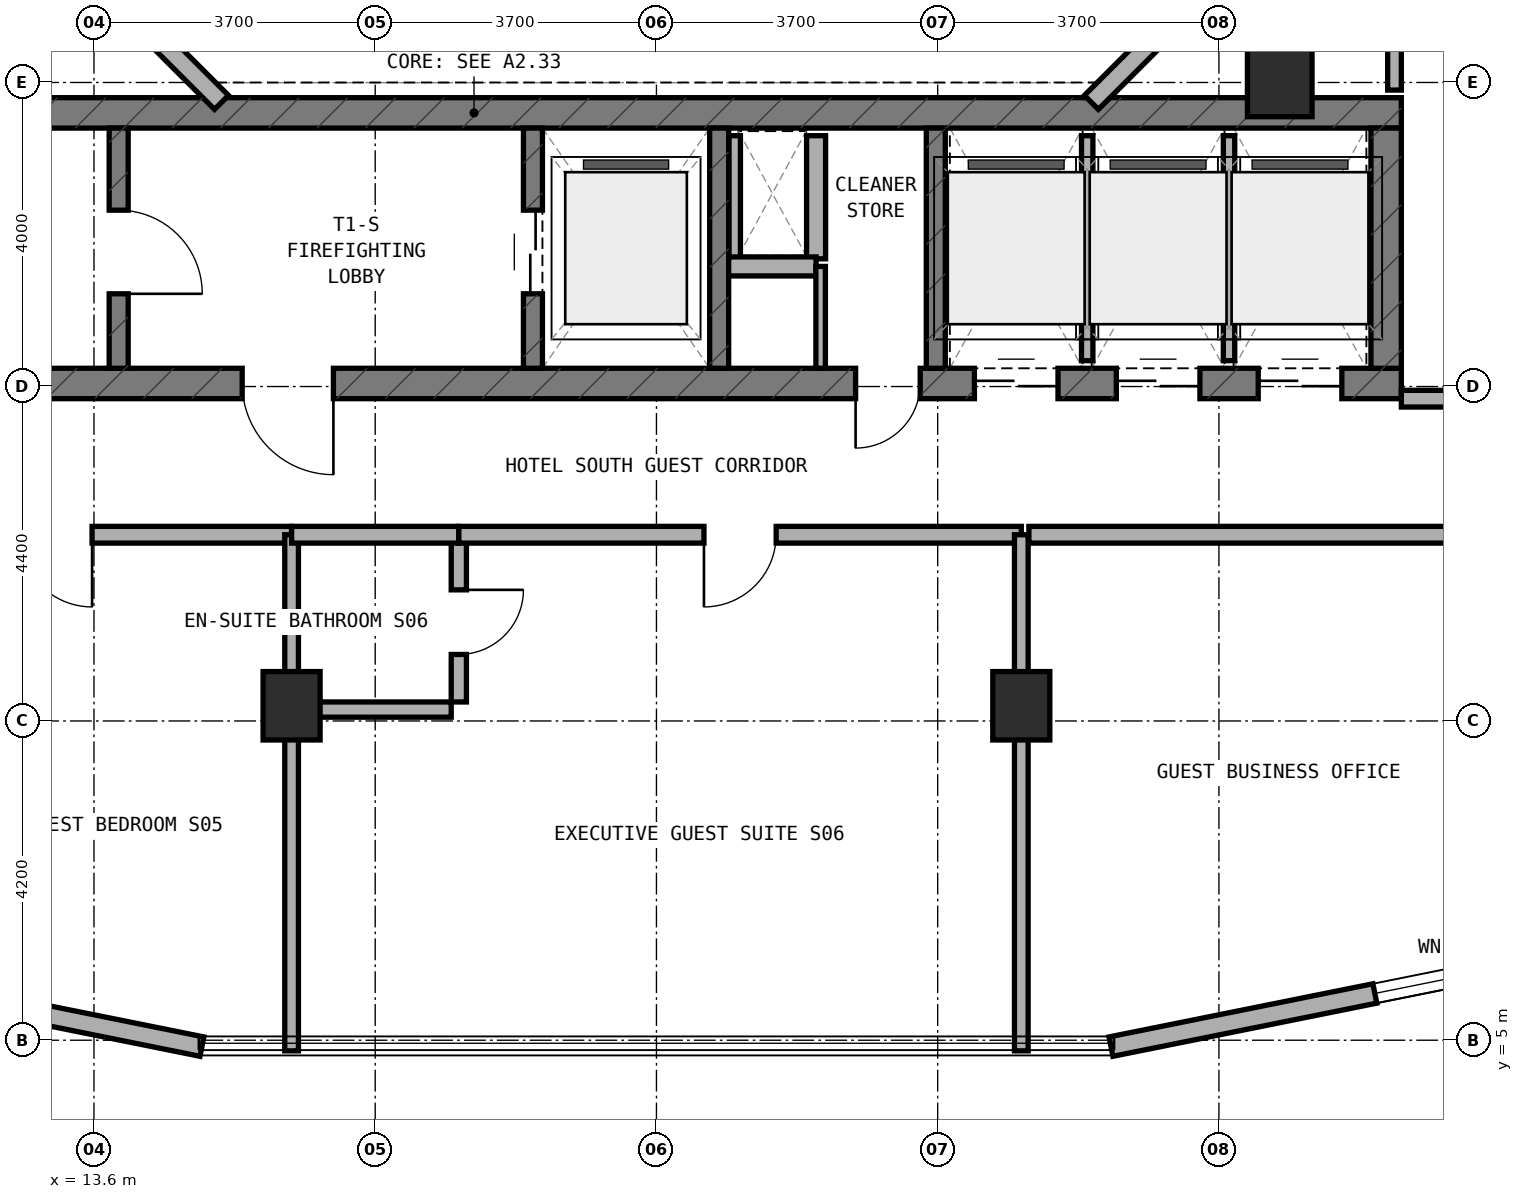
"""IFC4 building model, lengths in metres.
Left out: names, types, materials, properties, quantities, classifications, styles, units other than length and angle.
Written with IfcOpenShell. Run it as: python <this file> out.ifc"""

import sys

from ifc_helpers import new_model, si_unit, direction, frame, frame_2d, origin, origin_2d, place, context, subcontext, project, spatial, rectangle, extrude, element, fill, save


model = new_model("IFC4")
c1 = context("Model", 3, precision=1e-05, world=origin(), true_north=direction((0.0, 1.0)))
c2 = subcontext(c1, "Body", "Model", "MODEL_VIEW")
j1 = project(units=[si_unit("LENGTHUNIT", "METRE"), si_unit("PLANEANGLEUNIT", "RADIAN")], contexts=[c1])
p1 = place(None, origin())
s1 = spatial("IfcSite", under=j1, at=p1, CompositionType="ELEMENT")
p2 = place(p1, origin())
s2 = spatial("IfcBuilding", under=s1, at=p2, CompositionType="ELEMENT")
p3 = place(p2, frame((0.0, 0.0, 145.0)))
s3 = spatial("IfcBuildingStorey", under=s2, at=p3, CompositionType="ELEMENT", Elevation=145.0)
p4 = place(p3, frame((6.4, 13.64, 0.0), z_axis=(0.0, 0.0, 1.0), x_axis=(1.0, 0.0, 0.0)))
e1 = element("IfcWall", 1, at=p4, inside=s3, PredefinedType="SHEAR", context=c2, shape_type="SweptSolid", body=[
    extrude(rectangle(XDim=24.4, YDim=0.4, at=frame_2d((12.2, 0.0))), origin(), (0.0, 0.0, 1.0), 3.5),
])
p5 = place(p4, frame((9.15, 0.0, 0.0)))
e2 = element("IfcOpeningElement", 2, at=p5, cuts=e1, PredefinedType="OPENING", context=c2, shape_type="SweptSolid", body=[
    extrude(rectangle(XDim=1.2, YDim=2.15, at=frame_2d((0.6, 1.075))), frame((0.0, 0.21, 0.0), z_axis=(0.0, -1.0, 0.0), x_axis=(1.0, 0.0, 0.0)), (0.0, 0.0, 1.0), 0.42),
])
p6 = place(p4, frame((17.22, 0.0, 0.0)))
e3 = element("IfcOpeningElement", 3, at=p6, cuts=e1, PredefinedType="OPENING", context=c2, shape_type="SweptSolid", body=[
    extrude(rectangle(XDim=0.85, YDim=2.1, at=frame_2d((0.425, 1.05))), frame((0.0, 0.21, 0.0), z_axis=(0.0, -1.0, 0.0), x_axis=(1.0, 0.0, 0.0)), (0.0, 0.0, 1.0), 0.42),
])
p7 = place(p4, frame((18.783, 0.0, 0.0)))
e4 = element("IfcOpeningElement", 4, at=p7, cuts=e1, PredefinedType="OPENING", context=c2, shape_type="SweptSolid", body=[
    extrude(rectangle(XDim=1.1, YDim=2.15, at=frame_2d((0.55, 1.075))), frame((0.0, 0.21, 0.0), z_axis=(0.0, -1.0, 0.0), x_axis=(1.0, 0.0, 0.0)), (0.0, 0.0, 1.0), 0.42),
])
p8 = place(p4, frame((20.65, 0.0, 0.0)))
e5 = element("IfcOpeningElement", 5, at=p8, cuts=e1, PredefinedType="OPENING", context=c2, shape_type="SweptSolid", body=[
    extrude(rectangle(XDim=1.1, YDim=2.15, at=frame_2d((0.55, 1.075))), frame((0.0, 0.21, 0.0), z_axis=(0.0, -1.0, 0.0), x_axis=(1.0, 0.0, 0.0)), (0.0, 0.0, 1.0), 0.42),
])
p9 = place(p4, frame((22.517, 0.0, 0.0)))
e6 = element("IfcOpeningElement", 6, at=p9, cuts=e1, PredefinedType="OPENING", context=c2, shape_type="SweptSolid", body=[
    extrude(rectangle(XDim=1.1, YDim=2.15, at=frame_2d((0.55, 1.075))), frame((0.0, 0.21, 0.0), z_axis=(0.0, -1.0, 0.0), x_axis=(1.0, 0.0, 0.0)), (0.0, 0.0, 1.0), 0.42),
])
p10 = place(p3, frame((6.4, 17.2, 0.0), z_axis=(0.0, 0.0, 1.0), x_axis=(1.0, 0.0, 0.0)))
e7 = element("IfcWall", 7, at=p10, inside=s3, PredefinedType="SHEAR", context=c2, shape_type="SweptSolid", body=[
    extrude(rectangle(XDim=24.4, YDim=0.4, at=frame_2d((12.2, 0.0))), origin(), (0.0, 0.0, 1.0), 3.5),
])
p11 = place(p3, frame((30.6, 13.84, 0.0), z_axis=(0.0, 0.0, 1.0), x_axis=(0.0, 1.0, 0.0)))
e8 = element("IfcWall", 8, at=p11, inside=s3, PredefinedType="SHEAR", context=c2, shape_type="SweptSolid", body=[
    extrude(rectangle(XDim=3.16, YDim=0.4, at=frame_2d((1.58, 0.0))), origin(), (0.0, 0.0, 1.0), 3.5),
])
p12 = place(p3, frame((13.925, 13.84, 0.0), z_axis=(0.0, 0.0, 1.0), x_axis=(0.0, 1.0, 0.0)))
e9 = element("IfcWall", 9, at=p12, inside=s3, PredefinedType="STANDARD", context=c2, shape_type="SweptSolid", body=[
    extrude(rectangle(XDim=3.16, YDim=0.25, at=frame_2d((1.58, 0.0))), origin(), (0.0, 0.0, 1.0), 3.22),
])
p13 = place(p12, frame((0.98, 0.0, 0.0)))
e10 = element("IfcOpeningElement", 10, at=p13, cuts=e9, PredefinedType="OPENING", context=c2, shape_type="SweptSolid", body=[
    extrude(rectangle(XDim=1.1, YDim=2.15, at=frame_2d((0.55, 1.075))), frame((0.0, 0.135, 0.0), z_axis=(0.0, -1.0, 0.0), x_axis=(1.0, 0.0, 0.0)), (0.0, 0.0, 1.0), 0.27),
])
p14 = place(p3, frame((19.375, 13.84, 0.0), z_axis=(0.0, 0.0, 1.0), x_axis=(0.0, 1.0, 0.0)))
e11 = element("IfcWall", 11, at=p14, inside=s3, PredefinedType="STANDARD", context=c2, shape_type="SweptSolid", body=[
    extrude(rectangle(XDim=3.16, YDim=0.25, at=frame_2d((1.58, 0.0))), origin(), (0.0, 0.0, 1.0), 3.22),
])
p15 = place(p14, frame((0.98, 0.0, 0.0)))
e12 = element("IfcOpeningElement", 12, at=p15, cuts=e11, PredefinedType="OPENING", context=c2, shape_type="SweptSolid", body=[
    extrude(rectangle(XDim=1.1, YDim=2.15, at=frame_2d((0.55, 1.075))), frame((0.0, 0.135, 0.0), z_axis=(0.0, -1.0, 0.0), x_axis=(1.0, 0.0, 0.0)), (0.0, 0.0, 1.0), 0.27),
])
for number, where, z_axis, x_axis in (
    (13, (21.825, 13.84, 0.0), (0.0, 0.0, 1.0), (0.0, 1.0, 0.0)),
    (14, (24.675, 13.84, 0.0), (0.0, 0.0, 1.0), (0.0, 1.0, 0.0)),
):
    element("IfcWall", number, at=place(p3, frame(where, z_axis=z_axis, x_axis=x_axis)), inside=s3, PredefinedType="STANDARD", context=c2, shape_type="SweptSolid", body=[
        extrude(rectangle(XDim=3.16, YDim=0.25, at=frame_2d((1.58, 0.0))), origin(), (0.0, 0.0, 1.0), 3.22),
    ])
for number, where, z_axis, x_axis in (
    (15, (16.2, 9.4, 0.0), (0.0, 0.0, 1.0), (1.0, 0.0, 0.0)),
    (16, (25.8, 9.4, 0.0), (0.0, 0.0, 1.0), (1.0, 0.0, 0.0)),
):
    element("IfcColumn", number, at=place(p3, frame(where, z_axis=z_axis, x_axis=x_axis)), inside=s3, PredefinedType="COLUMN", context=c2, shape_type="SweptSolid", body=[
        extrude(rectangle(XDim=0.75, YDim=0.9, at=origin_2d()), origin(), (0.0, 0.0, 1.0), 3.5),
    ])
p16 = place(p3, frame((29.2, 17.65, 0.0), z_axis=(0.0, 0.0, 1.0), x_axis=(1.0, 0.0, 0.0)))
e17 = element("IfcColumn", 17, at=p16, inside=s3, PredefinedType="COLUMN", context=c2, shape_type="SweptSolid", body=[
    extrude(rectangle(XDim=0.85, YDim=1.0, at=origin_2d()), origin(), (0.0, 0.0, 1.0), 3.5),
])
p17 = place(p3, frame((6.018, 6.729, 0.0), z_axis=(0.0, 0.0, 1.0), x_axis=(0.980315963543, -0.197435082048, 0.0)))
e18 = element("IfcWall", 18, at=p17, inside=s3, PredefinedType="STANDARD", context=c2, shape_type="SweptSolid", body=[
    extrude(rectangle(XDim=9.183, YDim=0.26, at=frame_2d((4.591, 0.0))), origin(), (0.0, 0.0, 1.0), 3.22),
])
p18 = place(p17, frame((4.487, 0.0, 0.85)))
e19 = element("IfcOpeningElement", 19, at=p18, cuts=e18, PredefinedType="OPENING", context=c2, shape_type="SweptSolid", body=[
    extrude(rectangle(XDim=2.1, YDim=1.5, at=frame_2d((1.05, 0.75))), frame((0.0, 0.14, 0.0), z_axis=(0.0, -1.0, 0.0), x_axis=(1.0, 0.0, 0.0)), (0.0, 0.0, 1.0), 0.28),
])
p19 = place(p3, frame((26.98, 4.916, 0.0), z_axis=(0.0, 0.0, 1.0), x_axis=(0.980315963543, 0.197435082048, 0.0)))
e20 = element("IfcWall", 20, at=p19, inside=s3, PredefinedType="STANDARD", context=c2, shape_type="SweptSolid", body=[
    extrude(rectangle(XDim=9.183, YDim=0.26, at=frame_2d((4.591, 0.0))), origin(), (0.0, 0.0, 1.0), 3.22),
])
p20 = place(p19, frame((3.541, 0.0, 0.85)))
e21 = element("IfcOpeningElement", 21, at=p20, cuts=e20, PredefinedType="OPENING", context=c2, shape_type="SweptSolid", body=[
    extrude(rectangle(XDim=2.1, YDim=1.5, at=frame_2d((1.05, 0.75))), frame((0.0, 0.14, 0.0), z_axis=(0.0, -1.0, 0.0), x_axis=(1.0, 0.0, 0.0)), (0.0, 0.0, 1.0), 0.28),
])
for number, where, z_axis, x_axis in (
    (22, (26.722, 17.338, 0.0), (0.0, 0.0, 1.0), (0.707, 0.707, 0.0)),
    (23, (13.444, 19.172, 0.0), (0.0, 0.0, 1.0), (0.707, -0.707, 0.0)),
):
    element("IfcWall", number, at=place(p3, frame(where, z_axis=z_axis, x_axis=x_axis)), inside=s3, PredefinedType="STANDARD", context=c2, shape_type="SweptSolid", body=[
        extrude(rectangle(XDim=2.594, YDim=0.26, at=frame_2d((1.297, 0.0))), origin(), (0.0, 0.0, 1.0), 3.22),
    ])
p21 = place(p3, frame((22.03, 15.28, 0.0), z_axis=(0.0, 0.0, 1.0), x_axis=(0.0, 1.0, 0.0)))
e24 = element("IfcWall", 24, at=p21, inside=s3, PredefinedType="PARTITIONING", context=c2, shape_type="SweptSolid", body=[
    extrude(rectangle(XDim=1.62, YDim=0.15, at=frame_2d((0.81, 0.0))), origin(), (0.0, 0.0, 1.0), 3.22),
])
p22 = place(p3, frame((23.1, 15.28, 0.0), z_axis=(0.0, 0.0, 1.0), x_axis=(0.0, 1.0, 0.0)))
e25 = element("IfcWall", 25, at=p22, inside=s3, PredefinedType="SOLIDWALL", context=c2, shape_type="SweptSolid", body=[
    extrude(rectangle(XDim=1.62, YDim=0.25, at=frame_2d((0.81, 0.0))), origin(), (0.0, 0.0, 1.0), 3.22),
])
p23 = place(p3, frame((21.95, 15.18, 0.0), z_axis=(0.0, 0.0, 1.0), x_axis=(1.0, 0.0, 0.0)))
e26 = element("IfcWall", 26, at=p23, inside=s3, PredefinedType="SOLIDWALL", context=c2, shape_type="SweptSolid", body=[
    extrude(rectangle(XDim=1.15, YDim=0.25, at=frame_2d((0.575, 0.0))), origin(), (0.0, 0.0, 1.0), 3.22),
])
p24 = place(p3, frame((23.16, 13.84, 0.0), z_axis=(0.0, 0.0, 1.0), x_axis=(0.0, 1.0, 0.0)))
e27 = element("IfcWall", 27, at=p24, inside=s3, PredefinedType="PARTITIONING", context=c2, shape_type="SweptSolid", body=[
    extrude(rectangle(XDim=1.34, YDim=0.125, at=frame_2d((0.67, 0.0))), origin(), (0.0, 0.0, 1.0), 3.22),
])
p25 = place(p3, frame((26.667, 13.94, 0.0), z_axis=(0.0, 0.0, 1.0), x_axis=(0.0, 1.0, 0.0)))
e28 = element("IfcWall", 28, at=p25, inside=s3, PredefinedType="PARTITIONING", context=c2, shape_type="SweptSolid", body=[
    extrude(rectangle(XDim=2.96, YDim=0.15, at=frame_2d((1.48, 0.0))), origin(), (0.0, 0.0, 1.0), 3.22),
])
p26 = place(p3, frame((28.533, 13.94, 0.0), z_axis=(0.0, 0.0, 1.0), x_axis=(0.0, 1.0, 0.0)))
e29 = element("IfcWall", 29, at=p26, inside=s3, PredefinedType="PARTITIONING", context=c2, shape_type="SweptSolid", body=[
    extrude(rectangle(XDim=2.96, YDim=0.15, at=frame_2d((1.48, 0.0))), origin(), (0.0, 0.0, 1.0), 2.795),
])
p27 = place(p3, frame((10.0, 11.65, 0.0), z_axis=(0.0, 0.0, 1.0), x_axis=(1.0, 0.0, 0.0)))
e30 = element("IfcWall", 30, at=p27, inside=s3, PredefinedType="SOLIDWALL", context=c2, shape_type="SweptSolid", body=[
    extrude(rectangle(XDim=6.2, YDim=0.22, at=frame_2d((3.1, 0.0))), origin(), (0.0, 0.0, 1.0), 2.795),
])
p28 = place(p27, frame((2.625, 0.0, 0.0)))
e31 = element("IfcOpeningElement", 31, at=p28, cuts=e30, PredefinedType="OPENING", context=c2, shape_type="SweptSolid", body=[
    extrude(rectangle(XDim=0.95, YDim=2.1, at=frame_2d((0.475, 1.05))), frame((0.0, 0.12, 0.0), z_axis=(0.0, -1.0, 0.0), x_axis=(1.0, 0.0, 0.0)), (0.0, 0.0, 1.0), 0.24),
])
p29 = place(p3, frame((16.2, 4.86, 0.0), z_axis=(0.0, 0.0, 1.0), x_axis=(0.0, 1.0, 0.0)))
e32 = element("IfcWall", 32, at=p29, inside=s3, PredefinedType="SOLIDWALL", context=c2, shape_type="SweptSolid", body=[
    extrude(rectangle(XDim=6.79, YDim=0.18, at=frame_2d((3.395, 0.0))), origin(), (0.0, 0.0, 1.0), 2.795),
])
p30 = place(p3, frame((18.4, 9.45, 0.0), z_axis=(0.0, 0.0, 1.0), x_axis=(0.0, 1.0, 0.0)))
e33 = element("IfcWall", 33, at=p30, inside=s3, PredefinedType="PLUMBINGWALL", context=c2, shape_type="SweptSolid", body=[
    extrude(rectangle(XDim=2.1, YDim=0.2, at=frame_2d((1.05, 0.0))), origin(), (0.0, 0.0, 1.0), 2.835),
])
p31 = place(p30, frame((0.625, 0.0, 0.0)))
e34 = element("IfcOpeningElement", 34, at=p31, cuts=e33, PredefinedType="OPENING", context=c2, shape_type="SweptSolid", body=[
    extrude(rectangle(XDim=0.85, YDim=2.1, at=frame_2d((0.425, 1.05))), frame((0.0, 0.11, 0.0), z_axis=(0.0, -1.0, 0.0), x_axis=(1.0, 0.0, 0.0)), (0.0, 0.0, 1.0), 0.22),
])
p32 = place(p3, frame((16.3, 9.35, 0.0), z_axis=(0.0, 0.0, 1.0), x_axis=(1.0, 0.0, 0.0)))
e35 = element("IfcWall", 35, at=p32, inside=s3, PredefinedType="PLUMBINGWALL", context=c2, shape_type="SweptSolid", body=[
    extrude(rectangle(XDim=2.0, YDim=0.2, at=frame_2d((1.0, 0.0))), origin(), (0.0, 0.0, 1.0), 2.835),
])
p33 = place(p3, frame((16.2, 11.65, 0.0), z_axis=(0.0, 0.0, 1.0), x_axis=(1.0, 0.0, 0.0)))
e36 = element("IfcWall", 36, at=p33, inside=s3, PredefinedType="SOLIDWALL", context=c2, shape_type="SweptSolid", body=[
    extrude(rectangle(XDim=2.2, YDim=0.22, at=frame_2d((1.1, 0.0))), origin(), (0.0, 0.0, 1.0), 2.795),
])
p34 = place(p3, frame((18.4, 11.65, 0.0), z_axis=(0.0, 0.0, 1.0), x_axis=(1.0, 0.0, 0.0)))
e37 = element("IfcWall", 37, at=p34, inside=s3, PredefinedType="SOLIDWALL", context=c2, shape_type="SweptSolid", body=[
    extrude(rectangle(XDim=7.4, YDim=0.22, at=frame_2d((3.7, 0.0))), origin(), (0.0, 0.0, 1.0), 2.795),
])
p35 = place(p34, frame((3.225, 0.0, 0.0)))
e38 = element("IfcOpeningElement", 38, at=p35, cuts=e37, PredefinedType="OPENING", context=c2, shape_type="SweptSolid", body=[
    extrude(rectangle(XDim=0.95, YDim=2.1, at=frame_2d((0.475, 1.05))), frame((0.0, 0.12, 0.0), z_axis=(0.0, -1.0, 0.0), x_axis=(1.0, 0.0, 0.0)), (0.0, 0.0, 1.0), 0.24),
])
p36 = place(p3, frame((25.8, 4.86, 0.0), z_axis=(0.0, 0.0, 1.0), x_axis=(0.0, 1.0, 0.0)))
e39 = element("IfcWall", 39, at=p36, inside=s3, PredefinedType="SOLIDWALL", context=c2, shape_type="SweptSolid", body=[
    extrude(rectangle(XDim=6.79, YDim=0.18, at=frame_2d((3.395, 0.0))), origin(), (0.0, 0.0, 1.0), 2.795),
])
p37 = place(p3, frame((25.9, 11.65, 0.0), z_axis=(0.0, 0.0, 1.0), x_axis=(1.0, 0.0, 0.0)))
e40 = element("IfcWall", 40, at=p37, inside=s3, PredefinedType="SOLIDWALL", context=c2, shape_type="SweptSolid", body=[
    extrude(rectangle(XDim=15.04, YDim=0.22, at=frame_2d((7.52, 0.0))), origin(), (0.0, 0.0, 1.0), 2.795),
])
p38 = place(p37, frame((6.33, 0.0, 0.0)))
e41 = element("IfcOpeningElement", 41, at=p38, cuts=e40, PredefinedType="OPENING", context=c2, shape_type="SweptSolid", body=[
    extrude(rectangle(XDim=0.95, YDim=2.1, at=frame_2d((0.475, 1.05))), frame((0.0, 0.12, 0.0), z_axis=(0.0, -1.0, 0.0), x_axis=(1.0, 0.0, 0.0)), (0.0, 0.0, 1.0), 0.24),
])
p39 = place(p3, frame((30.71, 17.5, 0.0), z_axis=(0.0, 0.0, 1.0), x_axis=(0.0, 1.0, 0.0)))
e42 = element("IfcWall", 42, at=p39, inside=s3, PredefinedType="SOLIDWALL", context=c2, shape_type="SweptSolid", body=[
    extrude(rectangle(XDim=15.0, YDim=0.18, at=frame_2d((7.5, 0.0))), origin(), (0.0, 0.0, 1.0), 2.795),
])
p40 = place(p3, frame((30.8, 13.44, 0.0), z_axis=(0.0, 0.0, 1.0), x_axis=(1.0, 0.0, 0.0)))
e43 = element("IfcWall", 43, at=p40, inside=s3, PredefinedType="SOLIDWALL", context=c2, shape_type="SweptSolid", body=[
    extrude(rectangle(XDim=5.65, YDim=0.22, at=frame_2d((2.825, 0.0))), origin(), (0.0, 0.0, 1.0), 2.795),
])
p41 = place(p40, frame((2.35, 0.0, 0.0)))
e44 = element("IfcOpeningElement", 44, at=p41, cuts=e43, PredefinedType="OPENING", context=c2, shape_type="SweptSolid", body=[
    extrude(rectangle(XDim=0.95, YDim=2.1, at=frame_2d((0.475, 1.05))), frame((0.0, 0.12, 0.0), z_axis=(0.0, -1.0, 0.0), x_axis=(1.0, 0.0, 0.0)), (0.0, 0.0, 1.0), 0.24),
])
p42 = place(p20, origin())
e45 = element("IfcWindow", 45, at=p42, inside=s3, PartitioningType="SINGLE_PANEL", PredefinedType="WINDOW", context=c2, shape_type="SweptSolid", body=[
    extrude(rectangle(XDim=2.1, YDim=1.5, at=frame_2d((1.05, 0.75))), frame((0.0, 0.03, 0.0), z_axis=(0.0, -1.0, 0.0), x_axis=(1.0, 0.0, 0.0)), (0.0, 0.0, 1.0), 0.06),
])
fill(e21, e45)
p43 = place(p13, frame((1.1, 0.0, 0.0), z_axis=(0.0, 0.0, 1.0), x_axis=(-1.0, 0.0, 0.0)))
e46 = element("IfcDoor", 46, at=p43, inside=s3, OperationType="SINGLE_SWING_RIGHT", PredefinedType="DOOR", context=c2, shape_type="SweptSolid", body=[
    extrude(rectangle(XDim=1.1, YDim=2.15, at=frame_2d((0.55, 1.075))), frame((0.0, 0.025, 0.0), z_axis=(0.0, -1.0, 0.0), x_axis=(1.0, 0.0, 0.0)), (0.0, 0.0, 1.0), 0.05),
])
fill(e10, e46)
p44 = place(p5, frame((1.2, 0.0, 0.0), z_axis=(0.0, 0.0, 1.0), x_axis=(-1.0, 0.0, 0.0)))
e47 = element("IfcDoor", 47, at=p44, inside=s3, OperationType="SINGLE_SWING_LEFT", PredefinedType="DOOR", context=c2, shape_type="SweptSolid", body=[
    extrude(rectangle(XDim=1.2, YDim=2.15, at=frame_2d((0.6, 1.075))), frame((0.0, 0.025, 0.0), z_axis=(0.0, -1.0, 0.0), x_axis=(1.0, 0.0, 0.0)), (0.0, 0.0, 1.0), 0.05),
])
fill(e2, e47)
p45 = place(p15, origin())
e48 = element("IfcDoor", 48, at=p45, inside=s3, OperationType="DOUBLE_DOOR_SLIDING", PredefinedType="DOOR", context=c2, shape_type="SweptSolid", body=[
    extrude(rectangle(XDim=1.1, YDim=2.15, at=frame_2d((0.55, 1.075))), frame((0.0, 0.025, 0.0), z_axis=(0.0, -1.0, 0.0), x_axis=(1.0, 0.0, 0.0)), (0.0, 0.0, 1.0), 0.05),
])
fill(e12, e48)
p46 = place(p6, frame((0.85, 0.0, 0.0), z_axis=(0.0, 0.0, 1.0), x_axis=(-1.0, 0.0, 0.0)))
e49 = element("IfcDoor", 49, at=p46, inside=s3, OperationType="SINGLE_SWING_RIGHT", PredefinedType="DOOR", context=c2, shape_type="SweptSolid", body=[
    extrude(rectangle(XDim=0.85, YDim=2.1, at=frame_2d((0.425, 1.05))), frame((0.0, 0.025, 0.0), z_axis=(0.0, -1.0, 0.0), x_axis=(1.0, 0.0, 0.0)), (0.0, 0.0, 1.0), 0.05),
])
fill(e3, e49)
p47 = place(p7, frame((1.1, 0.0, 0.0), z_axis=(0.0, 0.0, 1.0), x_axis=(-1.0, 0.0, 0.0)))
e50 = element("IfcDoor", 50, at=p47, inside=s3, OperationType="DOUBLE_DOOR_SLIDING", PredefinedType="DOOR", context=c2, shape_type="SweptSolid", body=[
    extrude(rectangle(XDim=1.1, YDim=2.15, at=frame_2d((0.55, 1.075))), frame((0.0, 0.025, 0.0), z_axis=(0.0, -1.0, 0.0), x_axis=(1.0, 0.0, 0.0)), (0.0, 0.0, 1.0), 0.05),
])
fill(e4, e50)
p48 = place(p8, frame((1.1, 0.0, 0.0), z_axis=(0.0, 0.0, 1.0), x_axis=(-1.0, 0.0, 0.0)))
e51 = element("IfcDoor", 51, at=p48, inside=s3, OperationType="DOUBLE_DOOR_SLIDING", PredefinedType="DOOR", context=c2, shape_type="SweptSolid", body=[
    extrude(rectangle(XDim=1.1, YDim=2.15, at=frame_2d((0.55, 1.075))), frame((0.0, 0.025, 0.0), z_axis=(0.0, -1.0, 0.0), x_axis=(1.0, 0.0, 0.0)), (0.0, 0.0, 1.0), 0.05),
])
fill(e5, e51)
p49 = place(p9, frame((1.1, 0.0, 0.0), z_axis=(0.0, 0.0, 1.0), x_axis=(-1.0, 0.0, 0.0)))
e52 = element("IfcDoor", 52, at=p49, inside=s3, OperationType="DOUBLE_DOOR_SLIDING", PredefinedType="DOOR", context=c2, shape_type="SweptSolid", body=[
    extrude(rectangle(XDim=1.1, YDim=2.15, at=frame_2d((0.55, 1.075))), frame((0.0, 0.025, 0.0), z_axis=(0.0, -1.0, 0.0), x_axis=(1.0, 0.0, 0.0)), (0.0, 0.0, 1.0), 0.05),
])
fill(e6, e52)
p50 = place(p28, frame((0.95, 0.0, 0.0), z_axis=(0.0, 0.0, 1.0), x_axis=(-1.0, 0.0, 0.0)))
e53 = element("IfcDoor", 53, at=p50, inside=s3, OperationType="SINGLE_SWING_LEFT", PredefinedType="DOOR", context=c2, shape_type="SweptSolid", body=[
    extrude(rectangle(XDim=0.95, YDim=2.1, at=frame_2d((0.475, 1.05))), frame((0.0, 0.025, 0.0), z_axis=(0.0, -1.0, 0.0), x_axis=(1.0, 0.0, 0.0)), (0.0, 0.0, 1.0), 0.05),
])
fill(e31, e53)
p51 = place(p31, frame((0.85, 0.0, 0.0), z_axis=(0.0, 0.0, 1.0), x_axis=(-1.0, 0.0, 0.0)))
e54 = element("IfcDoor", 54, at=p51, inside=s3, OperationType="SINGLE_SWING_LEFT", PredefinedType="DOOR", context=c2, shape_type="SweptSolid", body=[
    extrude(rectangle(XDim=0.85, YDim=2.1, at=frame_2d((0.425, 1.05))), frame((0.0, 0.025, 0.0), z_axis=(0.0, -1.0, 0.0), x_axis=(1.0, 0.0, 0.0)), (0.0, 0.0, 1.0), 0.05),
])
fill(e34, e54)
p52 = place(p35, frame((0.95, 0.0, 0.0), z_axis=(0.0, 0.0, 1.0), x_axis=(-1.0, 0.0, 0.0)))
e55 = element("IfcDoor", 55, at=p52, inside=s3, OperationType="SINGLE_SWING_RIGHT", PredefinedType="DOOR", context=c2, shape_type="SweptSolid", body=[
    extrude(rectangle(XDim=0.95, YDim=2.1, at=frame_2d((0.475, 1.05))), frame((0.0, 0.025, 0.0), z_axis=(0.0, -1.0, 0.0), x_axis=(1.0, 0.0, 0.0)), (0.0, 0.0, 1.0), 0.05),
])
fill(e38, e55)
save(model, sys.argv[1])
